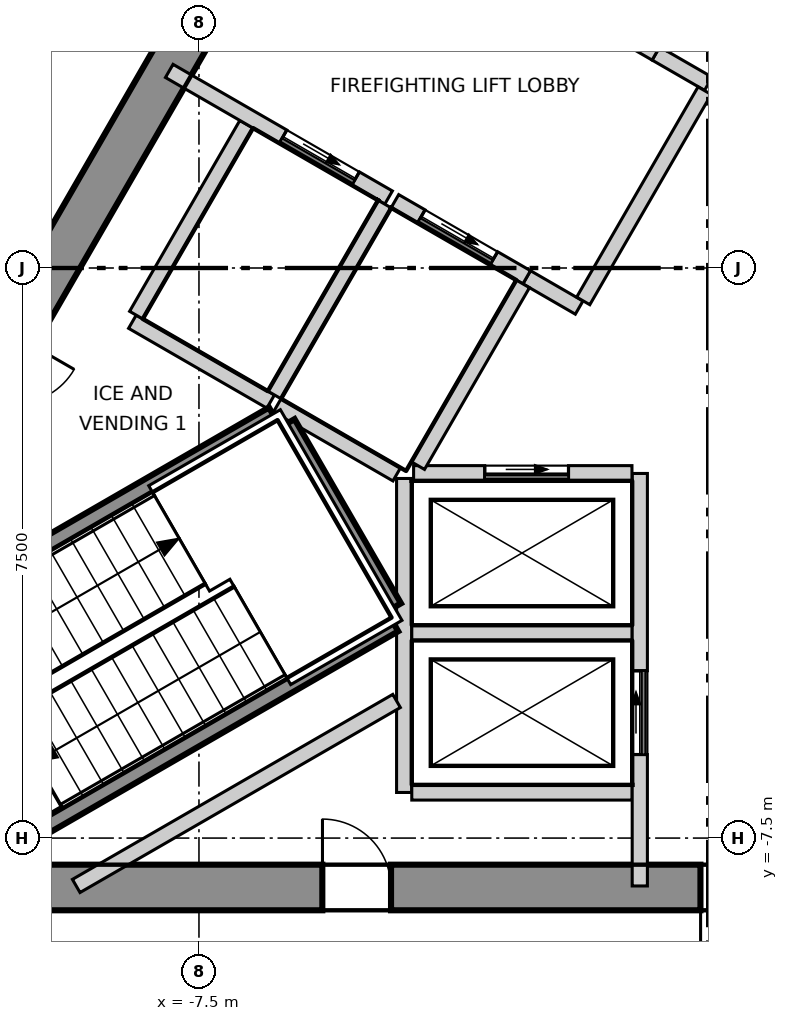
"""IFC4 building model, lengths in metres.
Left out: names, types, materials, properties, quantities, classifications, styles, units other than length and angle.
Written with IfcOpenShell. Run it as: python <this file> out.ifc"""

import sys

from ifc_helpers import new_model, si_unit, direction, frame, frame_2d, origin, place, context, subcontext, project, spatial, polyline, rectangle, outline, extrude, element, fill, save


model = new_model("IFC4")
c1 = context("Model", 3, precision=1e-05, world=origin(), true_north=direction((0.0, 1.0)))
c2 = subcontext(c1, "Body", "Model", "MODEL_VIEW")
j1 = project(units=[si_unit("LENGTHUNIT", "METRE"), si_unit("PLANEANGLEUNIT", "RADIAN")], contexts=[c1])
p1 = place(None, origin())
s1 = spatial("IfcSite", under=j1, at=p1, CompositionType="ELEMENT")
p2 = place(p1, origin())
s2 = spatial("IfcBuilding", under=s1, at=p2, CompositionType="ELEMENT")
p3 = place(p2, frame((0.0, 0.0, 311.5)))
s3 = spatial("IfcBuildingStorey", under=s2, at=p3, CompositionType="ELEMENT", Elevation=311.5)
p4 = place(p3, frame((-1.732, 13.3, -0.3), z_axis=(0.0, 0.0, 1.0), x_axis=(-0.500000539815, -0.866025092122, 0.0)))
e1 = element("IfcWall", 1, at=p4, inside=s3, PredefinedType="SHEAR", context=c2, shape_type="SweptSolid", body=[
    extrude(outline(polyline([(-0.173, -0.3), (1.795, -0.3), (3.763, -0.3), (5.732, -0.3), (7.7, -0.3), (9.668, -0.301), (11.637, -0.301), (13.605, -0.301), (15.573, -0.301), (17.542, -0.301), (19.51, -0.301), (21.478, -0.301), (21.131, 0.3), (19.226, 0.3), (17.321, 0.3), (15.415, 0.3), (13.51, 0.3), (11.605, 0.3), (9.699, 0.3), (7.794, 0.3), (5.889, 0.3), (3.984, 0.3), (2.078, 0.3), (0.173, 0.3), (-0.173, -0.3)])), origin(), (0.0, 0.0, 1.0), 3.6),
])
p5 = place(p4, frame((10.102, 0.0, 0.3)))
e2 = element("IfcOpeningElement", 2, at=p5, cuts=e1, PredefinedType="OPENING", context=c2, shape_type="SweptSolid", body=[
    extrude(rectangle(XDim=1.1, YDim=2.1, at=frame_2d((0.55, 1.05))), frame((0.0, 0.31, 0.0), z_axis=(0.0, -1.0, 0.0), x_axis=(1.0, 0.0, 0.0)), (0.0, 0.0, 1.0), 0.621),
])
p6 = place(p4, frame((16.378, 0.0, 0.3)))
e3 = element("IfcOpeningElement", 3, at=p6, cuts=e1, PredefinedType="OPENING", context=c2, shape_type="SweptSolid", body=[
    extrude(rectangle(XDim=0.9, YDim=2.1, at=frame_2d((0.45, 1.05))), frame((0.0, 0.31, 0.0), z_axis=(0.0, -1.0, 0.0), x_axis=(1.0, 0.0, 0.0)), (0.0, 0.0, 1.0), 0.621),
])
p7 = place(p4, frame((4.106, 0.0, 0.3)))
e4 = element("IfcOpeningElement", 4, at=p7, cuts=e1, PredefinedType="OPENING", context=c2, shape_type="SweptSolid", body=[
    extrude(rectangle(XDim=1.0, YDim=2.1, at=frame_2d((0.5, 1.05))), frame((0.0, 0.31, 0.0), z_axis=(0.0, -1.0, 0.0), x_axis=(1.0, 0.0, 0.0)), (0.0, 0.0, 1.0), 0.621),
])
p8 = place(p3, frame((-10.652, -8.15, -0.3), z_axis=(0.0, 0.0, 1.0), x_axis=(1.0, 0.0, 0.0)))
e5 = element("IfcWall", 5, at=p8, inside=s3, PredefinedType="SHEAR", context=c2, shape_type="SweptSolid", body=[
    extrude(outline(polyline([(-0.173, -0.3), (1.795, -0.3), (3.763, -0.3), (5.731, -0.3), (7.7, -0.3), (9.668, -0.3), (11.636, -0.3), (13.604, -0.3), (15.573, -0.3), (17.541, -0.3), (19.509, -0.3), (21.477, -0.3), (21.131, 0.3), (19.226, 0.3), (17.321, 0.3), (15.415, 0.3), (13.51, 0.3), (11.605, 0.3), (9.699, 0.3), (7.794, 0.3), (5.889, 0.3), (3.984, 0.3), (2.078, 0.3), (0.173, 0.3), (-0.173, -0.3)])), origin(), (0.0, 0.0, 1.0), 3.6),
])
p9 = place(p8, frame((9.752, 0.0, 0.3)))
e6 = element("IfcOpeningElement", 6, at=p9, cuts=e5, PredefinedType="OPENING", context=c2, shape_type="SweptSolid", body=[
    extrude(rectangle(XDim=1.8, YDim=2.1, at=frame_2d((0.9, 1.05))), frame((0.0, 0.31, 0.0), z_axis=(0.0, -1.0, 0.0), x_axis=(1.0, 0.0, 0.0)), (0.0, 0.0, 1.0), 0.62),
])
p10 = place(p8, frame((4.777, 0.0, 0.3)))
e7 = element("IfcOpeningElement", 7, at=p10, cuts=e5, PredefinedType="OPENING", context=c2, shape_type="SweptSolid", body=[
    extrude(rectangle(XDim=0.9, YDim=2.1, at=frame_2d((0.45, 1.05))), frame((0.0, 0.31, 0.0), z_axis=(0.0, -1.0, 0.0), x_axis=(1.0, 0.0, 0.0)), (0.0, 0.0, 1.0), 0.62),
])
p11 = place(p8, frame((16.378, 0.0, 0.3)))
e8 = element("IfcOpeningElement", 8, at=p11, cuts=e5, PredefinedType="OPENING", context=c2, shape_type="SweptSolid", body=[
    extrude(rectangle(XDim=0.9, YDim=2.1, at=frame_2d((0.45, 1.05))), frame((0.0, 0.31, 0.0), z_axis=(0.0, -1.0, 0.0), x_axis=(1.0, 0.0, 0.0)), (0.0, 0.0, 1.0), 0.62),
])
p12 = place(p3, frame((-2.412, 26.948, 0.0), z_axis=(0.0, 0.0, 1.0), x_axis=(-0.500002044679, -0.866024223285, 0.0)))
e9 = element("IfcWall", 9, at=p12, inside=s3, PredefinedType="ELEMENTEDWALL", context=c2, shape_type="SweptSolid", body=[
    extrude(rectangle(XDim=44.243, YDim=0.2, at=frame_2d((22.122, 0.0))), origin(), (0.0, 0.0, 1.0), 3.3),
])
p13 = place(p12, frame((2.056, 0.0, 0.9)))
e10 = element("IfcOpeningElement", 10, at=p13, cuts=e9, PredefinedType="OPENING", context=c2, shape_type="SweptSolid", body=[
    extrude(rectangle(XDim=3.7, YDim=2.2, at=frame_2d((1.85, 1.1))), frame((0.0, 0.11, 0.0), z_axis=(0.0, -1.0, 0.0), x_axis=(1.0, 0.0, 0.0)), (0.0, 0.0, 1.0), 0.22),
])
p14 = place(p12, frame((7.263, 0.0, 0.9)))
e11 = element("IfcOpeningElement", 11, at=p14, cuts=e9, PredefinedType="OPENING", context=c2, shape_type="SweptSolid", body=[
    extrude(rectangle(XDim=3.7, YDim=2.2, at=frame_2d((1.85, 1.1))), frame((0.0, 0.11, 0.0), z_axis=(0.0, -1.0, 0.0), x_axis=(1.0, 0.0, 0.0)), (0.0, 0.0, 1.0), 0.22),
])
p15 = place(p12, frame((12.471, 0.0, 0.9)))
e12 = element("IfcOpeningElement", 12, at=p15, cuts=e9, PredefinedType="OPENING", context=c2, shape_type="SweptSolid", body=[
    extrude(rectangle(XDim=3.7, YDim=2.2, at=frame_2d((1.85, 1.1))), frame((0.0, 0.11, 0.0), z_axis=(0.0, -1.0, 0.0), x_axis=(1.0, 0.0, 0.0)), (0.0, 0.0, 1.0), 0.22),
])
p16 = place(p12, frame((17.678, 0.0, 0.9)))
e13 = element("IfcOpeningElement", 13, at=p16, cuts=e9, PredefinedType="OPENING", context=c2, shape_type="SweptSolid", body=[
    extrude(rectangle(XDim=3.7, YDim=2.2, at=frame_2d((1.85, 1.1))), frame((0.0, 0.11, 0.0), z_axis=(0.0, -1.0, 0.0), x_axis=(1.0, 0.0, 0.0)), (0.0, 0.0, 1.0), 0.22),
])
p17 = place(p12, frame((22.885, 0.0, 0.9)))
e14 = element("IfcOpeningElement", 14, at=p17, cuts=e9, PredefinedType="OPENING", context=c2, shape_type="SweptSolid", body=[
    extrude(rectangle(XDim=3.7, YDim=2.2, at=frame_2d((1.85, 1.1))), frame((0.0, 0.11, 0.0), z_axis=(0.0, -1.0, 0.0), x_axis=(1.0, 0.0, 0.0)), (0.0, 0.0, 1.0), 0.22),
])
p18 = place(p12, frame((28.092, 0.0, 0.9)))
e15 = element("IfcOpeningElement", 15, at=p18, cuts=e9, PredefinedType="OPENING", context=c2, shape_type="SweptSolid", body=[
    extrude(rectangle(XDim=3.7, YDim=2.2, at=frame_2d((1.85, 1.1))), frame((0.0, 0.11, 0.0), z_axis=(0.0, -1.0, 0.0), x_axis=(1.0, 0.0, 0.0)), (0.0, 0.0, 1.0), 0.22),
])
p19 = place(p12, frame((33.3, 0.0, 0.9)))
e16 = element("IfcOpeningElement", 16, at=p19, cuts=e9, PredefinedType="OPENING", context=c2, shape_type="SweptSolid", body=[
    extrude(rectangle(XDim=3.7, YDim=2.2, at=frame_2d((1.85, 1.1))), frame((0.0, 0.11, 0.0), z_axis=(0.0, -1.0, 0.0), x_axis=(1.0, 0.0, 0.0)), (0.0, 0.0, 1.0), 0.22),
])
p20 = place(p12, frame((38.507, 0.0, 0.9)))
e17 = element("IfcOpeningElement", 17, at=p20, cuts=e9, PredefinedType="OPENING", context=c2, shape_type="SweptSolid", body=[
    extrude(rectangle(XDim=3.7, YDim=2.2, at=frame_2d((1.85, 1.1))), frame((0.0, 0.11, 0.0), z_axis=(0.0, -1.0, 0.0), x_axis=(1.0, 0.0, 0.0)), (0.0, 0.0, 1.0), 0.22),
])
p21 = place(p3, frame((-17.678, -10.12, 0.0), z_axis=(0.0, 0.0, 1.0), x_axis=(0.49998824015, 0.86603219323, 0.0)))
e18 = element("IfcWall", 18, at=p21, inside=s3, PredefinedType="PARTITIONING", context=c2, shape_type="SweptSolid", body=[
    extrude(rectangle(XDim=35.357, YDim=0.15, at=frame_2d((17.678, 0.0))), origin(), (0.0, 0.0, 1.0), 3.3),
])
p22 = place(p21, frame((28.607, 0.0, 0.0)))
e19 = element("IfcOpeningElement", 19, at=p22, cuts=e18, PredefinedType="OPENING", context=c2, shape_type="SweptSolid", body=[
    extrude(rectangle(XDim=1.0, YDim=2.1, at=frame_2d((0.5, 1.05))), frame((0.0, 0.085, 0.0), z_axis=(0.0, -1.0, 0.0), x_axis=(1.0, 0.0, 0.0)), (0.0, 0.0, 1.0), 0.17),
])
p23 = place(p21, frame((13.86, 0.0, 0.0)))
e20 = element("IfcOpeningElement", 20, at=p23, cuts=e18, PredefinedType="OPENING", context=c2, shape_type="SweptSolid", body=[
    extrude(rectangle(XDim=1.0, YDim=2.1, at=frame_2d((0.5, 1.05))), frame((0.0, 0.085, 0.0), z_axis=(0.0, -1.0, 0.0), x_axis=(1.0, 0.0, 0.0)), (0.0, 0.0, 1.0), 0.17),
])
p24 = place(p21, frame((18.96, 0.0, 0.0)))
e21 = element("IfcOpeningElement", 21, at=p24, cuts=e18, PredefinedType="OPENING", context=c2, shape_type="SweptSolid", body=[
    extrude(rectangle(XDim=0.9, YDim=2.1, at=frame_2d((0.45, 1.05))), frame((0.0, 0.085, 0.0), z_axis=(0.0, -1.0, 0.0), x_axis=(1.0, 0.0, 0.0)), (0.0, 0.0, 1.0), 0.17),
])
p25 = place(p21, frame((16.86, 0.0, 0.0)))
e22 = element("IfcOpeningElement", 22, at=p25, cuts=e18, PredefinedType="OPENING", context=c2, shape_type="SweptSolid", body=[
    extrude(rectangle(XDim=0.9, YDim=2.1, at=frame_2d((0.45, 1.05))), frame((0.0, 0.085, 0.0), z_axis=(0.0, -1.0, 0.0), x_axis=(1.0, 0.0, 0.0)), (0.0, 0.0, 1.0), 0.17),
])
p26 = place(p21, frame((8.146, 0.0, 0.0)))
e23 = element("IfcOpeningElement", 23, at=p26, cuts=e18, PredefinedType="OPENING", context=c2, shape_type="SweptSolid", body=[
    extrude(rectangle(XDim=1.0, YDim=2.1, at=frame_2d((0.5, 1.05))), frame((0.0, 0.085, 0.0), z_axis=(0.0, -1.0, 0.0), x_axis=(1.0, 0.0, 0.0)), (0.0, 0.0, 1.0), 0.17),
])
p27 = place(p21, frame((3.038, 0.0, 0.0)))
e24 = element("IfcOpeningElement", 24, at=p27, cuts=e18, PredefinedType="OPENING", context=c2, shape_type="SweptSolid", body=[
    extrude(rectangle(XDim=1.0, YDim=2.1, at=frame_2d((0.5, 1.05))), frame((0.0, 0.085, 0.0), z_axis=(0.0, -1.0, 0.0), x_axis=(1.0, 0.0, 0.0)), (0.0, 0.0, 1.0), 0.17),
])
p28 = place(p3, frame((-8.376, -0.707, 0.0), z_axis=(0.0, 0.0, 1.0), x_axis=(0.866067520717, -0.499927044236, 0.0)))
e25 = element("IfcWall", 25, at=p28, inside=s3, PredefinedType="SOLIDWALL", context=c2, shape_type="SweptSolid", body=[
    extrude(rectangle(XDim=2.1, YDim=0.2, at=frame_2d((1.05, 0.0))), origin(), (0.0, 0.0, 1.0), 3.3),
])
p29 = place(p3, frame((-8.326, -0.62, 0.0), z_axis=(0.0, 0.0, 1.0), x_axis=(0.500023687443, 0.866011727401, 0.0)))
e26 = element("IfcWall", 26, at=p29, inside=s3, PredefinedType="SOLIDWALL", context=c2, shape_type="SweptSolid", body=[
    extrude(rectangle(XDim=2.9, YDim=0.2, at=frame_2d((1.45, 0.0))), origin(), (0.0, 0.0, 1.0), 3.3),
])
p30 = place(p3, frame((-4.8, -6.9, 0.0), z_axis=(0.0, 0.0, 1.0), x_axis=(0.0, 1.0, 0.0)))
e27 = element("IfcWall", 27, at=p30, inside=s3, PredefinedType="SOLIDWALL", context=c2, shape_type="SweptSolid", body=[
    extrude(rectangle(XDim=4.131, YDim=0.2, at=frame_2d((2.065, 0.0))), origin(), (0.0, 0.0, 1.0), 3.3),
])
for number, where, z_axis, x_axis in (
    (28, (-4.7, -6.9, 0.0), (0.0, 0.0, 1.0), (1.0, 0.0, 0.0)),
    (29, (-4.7, -4.8, 0.0), (0.0, 0.0, 1.0), (1.0, 0.0, 0.0)),
):
    element("IfcWall", number, at=place(p3, frame(where, z_axis=z_axis, x_axis=x_axis)), inside=s3, PredefinedType="SOLIDWALL", context=c2, shape_type="SweptSolid", body=[
        extrude(rectangle(XDim=2.9, YDim=0.2, at=frame_2d((1.45, 0.0))), origin(), (0.0, 0.0, 1.0), 3.3),
    ])
p31 = place(p3, frame((-1.7, -8.13, 0.0), z_axis=(0.0, 0.0, 1.0), x_axis=(0.0, 1.0, 0.0)))
e30 = element("IfcWall", 30, at=p31, inside=s3, PredefinedType="SOLIDWALL", context=c2, shape_type="SweptSolid", body=[
    extrude(rectangle(XDim=5.427, YDim=0.2, at=frame_2d((2.713, 0.0))), origin(), (0.0, 0.0, 1.0), 3.3),
])
p32 = place(p31, frame((1.73, 0.0, 0.0)))
e31 = element("IfcOpeningElement", 31, at=p32, cuts=e30, PredefinedType="OPENING", context=c2, shape_type="SweptSolid", body=[
    extrude(rectangle(XDim=1.1, YDim=2.1, at=frame_2d((0.55, 1.05))), frame((0.0, 0.11, 0.0), z_axis=(0.0, -1.0, 0.0), x_axis=(1.0, 0.0, 0.0)), (0.0, 0.0, 1.0), 0.22),
])
p33 = place(p3, frame((-4.676, -2.7, 0.0), z_axis=(0.0, 0.0, 1.0), x_axis=(1.0, 0.0, 0.0)))
e32 = element("IfcWall", 32, at=p33, inside=s3, PredefinedType="SOLIDWALL", context=c2, shape_type="SweptSolid", body=[
    extrude(rectangle(XDim=2.873, YDim=0.2, at=frame_2d((1.437, 0.0))), origin(), (0.0, 0.0, 1.0), 3.3),
])
p34 = place(p33, frame((0.937, 0.0, 0.0)))
e33 = element("IfcOpeningElement", 33, at=p34, cuts=e32, PredefinedType="OPENING", context=c2, shape_type="SweptSolid", body=[
    extrude(rectangle(XDim=1.1, YDim=2.1, at=frame_2d((0.55, 1.05))), frame((0.0, 0.11, 0.0), z_axis=(0.0, -1.0, 0.0), x_axis=(1.0, 0.0, 0.0)), (0.0, 0.0, 1.0), 0.22),
])
p35 = place(p3, frame((-7.891, 2.593, 0.0), z_axis=(0.0, 0.0, 1.0), x_axis=(0.866070917804, -0.499921159118, 0.0)))
e34 = element("IfcWall", 34, at=p35, inside=s3, PredefinedType="SOLIDWALL", context=c2, shape_type="SweptSolid", body=[
    extrude(rectangle(XDim=3.333, YDim=0.2, at=frame_2d((1.666, 0.0))), origin(), (0.0, 0.0, 1.0), 3.3),
])
p36 = place(p35, frame((1.73, 0.0, 0.0)))
e35 = element("IfcOpeningElement", 35, at=p36, cuts=e34, PredefinedType="OPENING", context=c2, shape_type="SweptSolid", body=[
    extrude(rectangle(XDim=1.1, YDim=2.1, at=frame_2d((0.55, 1.05))), frame((0.0, 0.11, 0.0), z_axis=(0.0, -1.0, 0.0), x_axis=(1.0, 0.0, 0.0)), (0.0, 0.0, 1.0), 0.22),
])
p37 = place(p3, frame((-3.188, -0.122, 0.0), z_axis=(0.0, 0.0, 1.0), x_axis=(0.865705793592, -0.50055317294, 0.0)))
e36 = element("IfcWall", 36, at=p37, inside=s3, PredefinedType="SOLIDWALL", context=c2, shape_type="SweptSolid", body=[
    extrude(rectangle(XDim=0.797, YDim=0.2, at=frame_2d((0.398, 0.0))), origin(), (0.0, 0.0, 1.0), 3.3),
])
p38 = place(p3, frame((-1.488, 2.822, 0.0), z_axis=(0.0, 0.0, 1.0), x_axis=(0.866236612152, -0.499633997809, 0.0)))
e37 = element("IfcWall", 37, at=p38, inside=s3, PredefinedType="SOLIDWALL", context=c2, shape_type="SweptSolid", body=[
    extrude(rectangle(XDim=0.796, YDim=0.2, at=frame_2d((0.398, 0.0))), origin(), (0.0, 0.0, 1.0), 3.3),
])
p39 = place(p3, frame((-2.444, -0.433, 0.0), z_axis=(0.0, 0.0, 1.0), x_axis=(0.500035624827, 0.866004834804, 0.0)))
e38 = element("IfcWall", 38, at=p39, inside=s3, PredefinedType="SOLIDWALL", context=c2, shape_type="SweptSolid", body=[
    extrude(rectangle(XDim=3.194, YDim=0.2, at=frame_2d((1.597, 0.0))), origin(), (0.0, 0.0, 1.0), 3.3),
])
p40 = place(p3, frame((-6.507, -1.67, 0.0), z_axis=(0.0, 0.0, 1.0), x_axis=(0.50012328804, 0.865954211699, 0.0)))
e39 = element("IfcWall", 39, at=p40, inside=s3, PredefinedType="SOLIDWALL", context=c2, shape_type="SweptSolid", body=[
    extrude(rectangle(XDim=2.9, YDim=0.2, at=frame_2d((1.45, 0.0))), origin(), (0.0, 0.0, 1.0), 3.3),
])
p41 = place(p3, frame((-6.47, -1.807, 0.0), z_axis=(0.0, 0.0, 1.0), x_axis=(0.865883195159, -0.500246231712, 0.0)))
e40 = element("IfcWall", 40, at=p41, inside=s3, PredefinedType="SOLIDWALL", context=c2, shape_type="SweptSolid", body=[
    extrude(rectangle(XDim=1.815, YDim=0.2, at=frame_2d((0.908, 0.0))), origin(), (0.0, 0.0, 1.0), 3.3),
])
p42 = place(p3, frame((-4.922, 0.879, 0.0), z_axis=(0.0, 0.0, 1.0), x_axis=(0.866073918653, -0.499915960366, 0.0)))
e41 = element("IfcWall", 41, at=p42, inside=s3, PredefinedType="SOLIDWALL", context=c2, shape_type="SweptSolid", body=[
    extrude(rectangle(XDim=2.002, YDim=0.2, at=frame_2d((1.001, 0.0))), origin(), (0.0, 0.0, 1.0), 3.3),
])
p43 = place(p42, frame((0.402, 0.0, 0.0)))
e42 = element("IfcOpeningElement", 42, at=p43, cuts=e41, PredefinedType="OPENING", context=c2, shape_type="SweptSolid", body=[
    extrude(rectangle(XDim=1.1, YDim=2.1, at=frame_2d((0.55, 1.05))), frame((0.0, 0.11, 0.0), z_axis=(0.0, -1.0, 0.0), x_axis=(1.0, 0.0, 0.0)), (0.0, 0.0, 1.0), 0.22),
])
p44 = place(p3, frame((-4.619, -2.6, 0.0), z_axis=(0.0, 0.0, 1.0), x_axis=(0.50009492287, 0.865970593103, 0.0)))
e43 = element("IfcWall", 43, at=p44, inside=s3, PredefinedType="SOLIDWALL", context=c2, shape_type="SweptSolid", body=[
    extrude(rectangle(XDim=2.761, YDim=0.2, at=frame_2d((1.381, 0.0))), origin(), (0.0, 0.0, 1.0), 3.3),
])
p45 = place(p3, frame((-3.309, 3.873, 0.0), z_axis=(0.0, 0.0, 1.0), x_axis=(0.866098583652, -0.499873227325, 0.0)))
e44 = element("IfcWall", 44, at=p45, inside=s3, PredefinedType="SOLIDWALL", context=c2, shape_type="SweptSolid", body=[
    extrude(rectangle(XDim=2.103, YDim=0.2, at=frame_2d((1.051, 0.0))), origin(), (0.0, 0.0, 1.0), 3.3),
])
p46 = place(p45, frame((0.502, 0.0, 0.0)))
e45 = element("IfcOpeningElement", 45, at=p46, cuts=e44, PredefinedType="OPENING", context=c2, shape_type="SweptSolid", body=[
    extrude(rectangle(XDim=1.1, YDim=2.1, at=frame_2d((0.55, 1.05))), frame((0.0, 0.11, 0.0), z_axis=(0.0, -1.0, 0.0), x_axis=(1.0, 0.0, 0.0)), (0.0, 0.0, 1.0), 0.22),
])
p47 = place(p3, frame((-9.115, -8.13, 0.0), z_axis=(0.0, 0.0, 1.0), x_axis=(0.866002649306, 0.500039409842, 0.0)))
e46 = element("IfcWall", 46, at=p47, inside=s3, PredefinedType="SOLIDWALL", context=c2, shape_type="SweptSolid", body=[
    extrude(rectangle(XDim=4.867, YDim=0.2, at=frame_2d((2.434, 0.0))), origin(), (0.0, 0.0, 1.0), 3.3),
])
p48 = place(p3, frame((-12.301, -5.254, 0.0), z_axis=(0.0, 0.0, 1.0), x_axis=(0.866068467981, 0.499925403204, 0.0)))
e47 = element("IfcWall", 47, at=p48, inside=s3, PredefinedType="SOLIDWALL", context=c2, shape_type="SweptSolid", body=[
    extrude(rectangle(XDim=6.665, YDim=0.2, at=frame_2d((3.332, 0.0))), origin(), (0.0, 0.0, 1.0), 3.3),
])
p49 = place(p3, frame((-6.329, -2.038, 0.0), z_axis=(0.0, 0.0, 1.0), x_axis=(0.500200581029, -0.865909567298, 0.0)))
e48 = element("IfcWall", 48, at=p49, inside=s3, PredefinedType="SOLIDWALL", context=c2, shape_type="SweptSolid", body=[
    extrude(rectangle(XDim=2.799, YDim=0.2, at=frame_2d((1.399, 0.0))), origin(), (0.0, 0.0, 1.0), 3.3),
])
p50 = place(p3, frame((-10.701, -8.026, 0.0), z_axis=(0.0, 0.0, 1.0), x_axis=(0.866005022404, 0.500035299925, 0.0)))
e49 = element("IfcWall", 49, at=p50, inside=s3, PredefinedType="SOLIDWALL", context=c2, shape_type="SweptSolid", body=[
    extrude(rectangle(XDim=6.665, YDim=0.2, at=frame_2d((3.333, 0.0))), origin(), (0.0, 0.0, 1.0), 3.3),
])
p51 = place(p34, origin())
e50 = element("IfcDoor", 50, at=p51, inside=s3, OperationType="SLIDING_TO_LEFT", PredefinedType="DOOR", context=c2, shape_type="SweptSolid", body=[
    extrude(rectangle(XDim=1.1, YDim=2.1, at=frame_2d((0.55, 1.05))), frame((0.0, 0.025, 0.0), z_axis=(0.0, -1.0, 0.0), x_axis=(1.0, 0.0, 0.0)), (0.0, 0.0, 1.0), 0.05),
])
fill(e33, e50)
p52 = place(p32, origin())
e51 = element("IfcDoor", 51, at=p52, inside=s3, OperationType="SLIDING_TO_LEFT", PredefinedType="DOOR", context=c2, shape_type="SweptSolid", body=[
    extrude(rectangle(XDim=1.1, YDim=2.1, at=frame_2d((0.55, 1.05))), frame((0.0, 0.025, 0.0), z_axis=(0.0, -1.0, 0.0), x_axis=(1.0, 0.0, 0.0)), (0.0, 0.0, 1.0), 0.05),
])
fill(e31, e51)
p53 = place(p43, origin())
e52 = element("IfcDoor", 52, at=p53, inside=s3, OperationType="SLIDING_TO_LEFT", PredefinedType="DOOR", context=c2, shape_type="SweptSolid", body=[
    extrude(rectangle(XDim=1.1, YDim=2.1, at=frame_2d((0.55, 1.05))), frame((0.0, 0.025, 0.0), z_axis=(0.0, -1.0, 0.0), x_axis=(1.0, 0.0, 0.0)), (0.0, 0.0, 1.0), 0.05),
])
fill(e42, e52)
p54 = place(p36, origin())
e53 = element("IfcDoor", 53, at=p54, inside=s3, OperationType="SLIDING_TO_LEFT", PredefinedType="DOOR", context=c2, shape_type="SweptSolid", body=[
    extrude(rectangle(XDim=1.1, YDim=2.1, at=frame_2d((0.55, 1.05))), frame((0.0, 0.025, 0.0), z_axis=(0.0, -1.0, 0.0), x_axis=(1.0, 0.0, 0.0)), (0.0, 0.0, 1.0), 0.05),
])
fill(e35, e53)
p55 = place(p9, origin())
e54 = element("IfcDoor", 54, at=p55, inside=s3, OperationType="DOUBLE_DOOR_SINGLE_SWING", PredefinedType="DOOR", context=c2, shape_type="SweptSolid", body=[
    extrude(rectangle(XDim=1.8, YDim=2.1, at=frame_2d((0.9, 1.05))), frame((0.0, 0.025, 0.0), z_axis=(0.0, -1.0, 0.0), x_axis=(1.0, 0.0, 0.0)), (0.0, 0.0, 1.0), 0.05),
])
fill(e6, e54)
p56 = place(p10, origin())
e55 = element("IfcDoor", 55, at=p56, inside=s3, OperationType="SINGLE_SWING_RIGHT", PredefinedType="DOOR", context=c2, shape_type="SweptSolid", body=[
    extrude(rectangle(XDim=0.9, YDim=2.1, at=frame_2d((0.45, 1.05))), frame((0.0, 0.025, 0.0), z_axis=(0.0, -1.0, 0.0), x_axis=(1.0, 0.0, 0.0)), (0.0, 0.0, 1.0), 0.05),
])
fill(e7, e55)
save(model, sys.argv[1])
